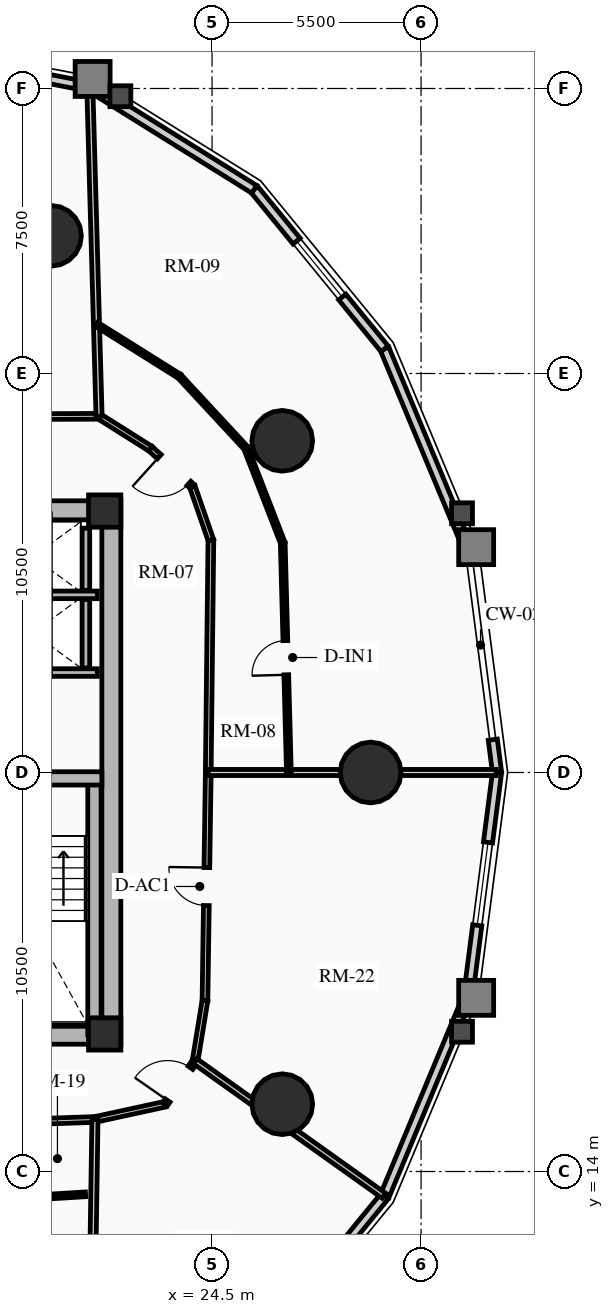
"""IFC4 building model, lengths in metres.
Left out: names, types, materials, properties, quantities, classifications, styles, units other than length and angle.
Written with IfcOpenShell. Run it as: python <this file> out.ifc"""

import sys

from ifc_helpers import new_model, si_unit, direction, frame, frame_2d, origin, origin_2d, place, context, subcontext, project, spatial, rectangle, circle, extrude, source, transform, mapped, element, fill, save


model = new_model("IFC4")
c1 = context("Model", 3, precision=1e-05, world=origin(), true_north=direction((0.0, 1.0)))
c2 = subcontext(c1, "Body", "Model", "MODEL_VIEW")
j1 = project(units=[si_unit("LENGTHUNIT", "METRE"), si_unit("PLANEANGLEUNIT", "RADIAN")], contexts=[c1])
p1 = place(None, origin())
s1 = spatial("IfcSite", under=j1, at=p1, CompositionType="ELEMENT")
p2 = place(p1, origin())
s2 = spatial("IfcBuilding", under=s1, at=p2, CompositionType="ELEMENT")
p3 = place(p2, frame((0.0, 0.0, 39.46)))
s3 = spatial("IfcBuildingStorey", under=s2, at=p3, CompositionType="ELEMENT", Elevation=39.46)
p4 = place(p3, frame((21.85, 17.35, 0.0), z_axis=(0.0, 0.0, 1.0), x_axis=(0.0, 1.0, 0.0)))
e1 = element("IfcWall", 1, at=p4, inside=s3, PredefinedType="SHEAR", context=c2, shape_type="SweptSolid", body=[
    extrude(rectangle(XDim=14.3, YDim=0.5, at=frame_2d((7.15, 0.0))), origin(), (0.0, 0.0, 1.0), 2.91),
])
p5 = place(p3, frame((11.15, 17.6, 0.0), z_axis=(0.0, 0.0, 1.0), x_axis=(1.0, 0.0, 0.0)))
e2 = element("IfcWall", 2, at=p5, inside=s3, PredefinedType="SHEAR", context=c2, shape_type="SweptSolid", body=[
    extrude(rectangle(XDim=10.7, YDim=0.5, at=frame_2d((5.35, 0.0))), origin(), (0.0, 0.0, 1.0), 2.91),
])
m1 = source(origin(), c2, "Body", "SweptSolid", [
    extrude(rectangle(XDim=1.5, YDim=2.02, at=frame_2d((0.75, 1.01))), frame((0.0, 0.26, 0.0), z_axis=(0.0, -1.0, 0.0), x_axis=(1.0, 0.0, 0.0)), (0.0, 0.0, 1.0), 0.52),
])
p6 = place(p5, frame((5.45, 0.0, 0.0)))
e3 = element("IfcOpeningElement", 3, at=p6, cuts=e2, PredefinedType="OPENING", context=c2, shape_type="MappedRepresentation", body=[
    mapped(m1, transform((0.0, 0.0, 0.0), x_axis=(1.0, 0.0, 0.0), y_axis=(0.0, 1.0, 0.0), z_axis=(0.0, 0.0, 1.0), scale=1.0)),
])
p7 = place(p3, frame((11.15, 31.4, 0.0), z_axis=(0.0, 0.0, 1.0), x_axis=(1.0, 0.0, 0.0)))
e4 = element("IfcWall", 4, at=p7, inside=s3, PredefinedType="SHEAR", context=c2, shape_type="SweptSolid", body=[
    extrude(rectangle(XDim=10.7, YDim=0.5, at=frame_2d((5.35, 0.0))), origin(), (0.0, 0.0, 1.0), 2.91),
])
p8 = place(p7, frame((4.6, 0.0, 0.0)))
e5 = element("IfcOpeningElement", 5, at=p8, cuts=e4, PredefinedType="OPENING", context=c2, shape_type="MappedRepresentation", body=[
    mapped(m1, transform((0.0, 0.0, 0.0), x_axis=(1.0, 0.0, 0.0), y_axis=(0.0, 1.0, 0.0), z_axis=(0.0, 0.0, 1.0), scale=1.0)),
])
p9 = place(p3, frame((21.405, 17.6, 0.0), z_axis=(0.0, 0.0, 1.0), x_axis=(0.0, 1.0, 0.0)))
e6 = element("IfcWall", 6, at=p9, inside=s3, PredefinedType="SHEAR", context=c2, shape_type="SweptSolid", body=[
    extrude(rectangle(XDim=6.745, YDim=0.35, at=frame_2d((3.373, 0.0))), origin(), (0.0, 0.0, 1.0), 2.91),
])
p10 = place(p3, frame((18.315, 24.345, 0.0), z_axis=(0.0, 0.0, 1.0), x_axis=(1.0, 0.0, 0.0)))
e7 = element("IfcWall", 7, at=p10, inside=s3, PredefinedType="SHEAR", context=c2, shape_type="SweptSolid", body=[
    extrude(rectangle(XDim=3.285, YDim=0.35, at=frame_2d((1.643, 0.0))), origin(), (0.0, 0.0, 1.0), 2.91),
])
for number, where, z_axis, x_axis in (
    (8, (21.675, 17.62, 0.0), (0.0, 0.0, 1.0), (1.0, 0.0, 0.0)),
    (9, (21.675, 31.38, 0.0), (0.0, 0.0, 1.0), (1.0, 0.0, 0.0)),
):
    element("IfcColumn", number, at=place(p3, frame(where, z_axis=z_axis, x_axis=x_axis)), inside=s3, PredefinedType="COLUMN", context=c2, shape_type="SweptSolid", body=[
        extrude(rectangle(XDim=0.85, YDim=0.85, at=origin_2d()), origin(), (0.0, 0.0, 1.0), 2.91),
    ])
for number, where, z_axis, x_axis in (
    (10, (28.672, 24.5, 0.0), (0.0, 0.0, 1.0), (1.0, 0.0, 0.0)),
    (11, (26.347, 33.229, 0.0), (0.0, 0.0, 1.0), (1.0, 0.0, 0.0)),
    (12, (20.261, 38.623, 0.0), (0.0, 0.0, 1.0), (1.0, 0.0, 0.0)),
    (13, (26.347, 15.771, 0.0), (0.0, 0.0, 1.0), (1.0, 0.0, 0.0)),
):
    element("IfcColumn", number, at=place(p3, frame(where, z_axis=z_axis, x_axis=x_axis)), inside=s3, PredefinedType="USERDEFINED", context=c2, shape_type="SweptSolid", body=[
        extrude(circle(Radius=0.8, at=origin_2d()), origin(), (0.0, 0.0, 1.0), 2.91),
    ])
p11 = place(p3, frame((31.887, 25.363, 0.0), z_axis=(0.0, 0.0, 1.0), x_axis=(0.128523364007, -0.991706481225, 0.0)))
e14 = element("IfcWall", 14, at=p11, inside=s3, PredefinedType="SOLIDWALL", context=c2, shape_type="SweptSolid", body=[
    extrude(rectangle(XDim=0.87, YDim=0.24, at=frame_2d((0.435, 0.0))), origin(), (0.0, 0.0, 1.0), 2.635),
])
p12 = place(p3, frame((29.039, 35.65, 0.0), z_axis=(0.0, 0.0, 1.0), x_axis=(0.38430970593, -0.923204229804, 0.0)))
e15 = element("IfcWall", 15, at=p12, inside=s3, PredefinedType="SOLIDWALL", context=c2, shape_type="SweptSolid", body=[
    extrude(rectangle(XDim=5.728, YDim=0.24, at=frame_2d((2.864, 0.0))), origin(), (0.0, 0.0, 1.0), 2.073),
])
p13 = place(p3, frame((25.61, 39.847, 0.0), z_axis=(0.0, 0.0, 1.0), x_axis=(0.632710215588, -0.774388651189, 0.0)))
e16 = element("IfcWall", 16, at=p13, inside=s3, PredefinedType="SOLIDWALL", context=c2, shape_type="SweptSolid", body=[
    extrude(rectangle(XDim=5.419, YDim=0.24, at=frame_2d((2.71, 0.0))), origin(), (0.0, 0.0, 1.0), 2.073),
])
m2 = source(origin(), c2, "Body", "SweptSolid", [
    extrude(rectangle(XDim=1.9, YDim=1.35, at=frame_2d((0.95, 0.675))), frame((0.0, 0.13, 0.0), z_axis=(0.0, -1.0, 0.0), x_axis=(1.0, 0.0, 0.0)), (0.0, 0.0, 1.0), 0.26),
])
p14 = place(p13, frame((1.76, 0.0, 0.65)))
e17 = element("IfcOpeningElement", 17, at=p14, cuts=e16, PredefinedType="OPENING", context=c2, shape_type="MappedRepresentation", body=[
    mapped(m2, transform((0.0, 0.0, 0.0), x_axis=(1.0, 0.0, 0.0), y_axis=(0.0, 1.0, 0.0), z_axis=(0.0, 0.0, 1.0), scale=1.0)),
])
p15 = place(p3, frame((21.29, 42.542, 0.0), z_axis=(0.0, 0.0, 1.0), x_axis=(0.848528534887, -0.529149624853, 0.0)))
e18 = element("IfcWall", 18, at=p15, inside=s3, PredefinedType="SOLIDWALL", context=c2, shape_type="SweptSolid", body=[
    extrude(rectangle(XDim=5.092, YDim=0.24, at=frame_2d((2.546, 0.0))), origin(), (0.0, 0.0, 1.0), 2.073),
])
p16 = place(p3, frame((16.5, 43.47, 0.0), z_axis=(0.0, 0.0, 1.0), x_axis=(0.981724094622, -0.190309752872, 0.0)))
e19 = element("IfcWall", 19, at=p16, inside=s3, PredefinedType="SOLIDWALL", context=c2, shape_type="SweptSolid", body=[
    extrude(rectangle(XDim=4.879, YDim=0.24, at=frame_2d((2.439, 0.0))), origin(), (0.0, 0.0, 1.0), 2.073),
])
m3 = source(origin(), c2, "Body", "SweptSolid", [
    extrude(rectangle(XDim=2.2, YDim=1.35, at=frame_2d((1.1, 0.675))), frame((0.0, 0.13, 0.0), z_axis=(0.0, -1.0, 0.0), x_axis=(1.0, 0.0, 0.0)), (0.0, 0.0, 1.0), 0.26),
])
p17 = place(p16, frame((1.339, 0.0, 0.65)))
e20 = element("IfcOpeningElement", 20, at=p17, cuts=e19, PredefinedType="OPENING", context=c2, shape_type="MappedRepresentation", body=[
    mapped(m3, transform((0.0, 0.0, 0.0), x_axis=(1.0, 0.0, 0.0), y_axis=(0.0, 1.0, 0.0), z_axis=(0.0, 0.0, 1.0), scale=1.0)),
])
p18 = place(p3, frame((29.039, 13.35, 0.0), z_axis=(0.0, 0.0, 1.0), x_axis=(-0.632710215588, -0.774388651189, 0.0)))
e21 = element("IfcWall", 21, at=p18, inside=s3, PredefinedType="SOLIDWALL", context=c2, shape_type="SweptSolid", body=[
    extrude(rectangle(XDim=5.419, YDim=0.24, at=frame_2d((2.71, 0.0))), origin(), (0.0, 0.0, 1.0), 2.073),
])
p19 = place(p18, frame((1.76, 0.0, 0.65)))
e22 = element("IfcOpeningElement", 22, at=p19, cuts=e21, PredefinedType="OPENING", context=c2, shape_type="MappedRepresentation", body=[
    mapped(m2, transform((0.0, 0.0, 0.0), x_axis=(1.0, 0.0, 0.0), y_axis=(0.0, 1.0, 0.0), z_axis=(0.0, 0.0, 1.0), scale=1.0)),
])
p20 = place(p3, frame((31.24, 18.638, 0.0), z_axis=(0.0, 0.0, 1.0), x_axis=(-0.38430970593, -0.923204229804, 0.0)))
e23 = element("IfcWall", 23, at=p20, inside=s3, PredefinedType="SOLIDWALL", context=c2, shape_type="SweptSolid", body=[
    extrude(rectangle(XDim=5.728, YDim=0.24, at=frame_2d((2.864, 0.0))), origin(), (0.0, 0.0, 1.0), 2.073),
])
p21 = place(p3, frame((31.999, 24.5, 0.0), z_axis=(0.0, 0.0, 1.0), x_axis=(-0.128329107357, -0.991731637191, 0.0)))
e24 = element("IfcWall", 24, at=p21, inside=s3, PredefinedType="SOLIDWALL", context=c2, shape_type="SweptSolid", body=[
    extrude(rectangle(XDim=5.911, YDim=0.24, at=frame_2d((2.956, 0.0))), origin(), (0.0, 0.0, 1.0), 2.073),
])
p22 = place(p21, frame((1.855, 0.0, 0.65)))
e25 = element("IfcOpeningElement", 25, at=p22, cuts=e24, PredefinedType="OPENING", context=c2, shape_type="MappedRepresentation", body=[
    mapped(m3, transform((0.0, 0.0, 0.0), x_axis=(1.0, 0.0, 0.0), y_axis=(0.0, 1.0, 0.0), z_axis=(0.0, 0.0, 1.0), scale=1.0)),
])
for number, where, z_axis, x_axis in (
    (26, (18.51, 27.13, 0.0), (0.0, 0.0, 1.0), (1.0, 0.0, 0.0)),
    (27, (18.51, 29.175, 0.0), (0.0, 0.0, 1.0), (1.0, 0.0, 0.0)),
):
    element("IfcWall", number, at=place(p3, frame(where, z_axis=z_axis, x_axis=x_axis)), inside=s3, PredefinedType="SHEAR", context=c2, shape_type="SweptSolid", body=[
        extrude(rectangle(XDim=2.97, YDim=0.2, at=frame_2d((1.485, 0.0))), origin(), (0.0, 0.0, 1.0), 2.91),
    ])
p23 = place(p3, frame((21.18, 27.25, 0.0), z_axis=(0.0, 0.0, 1.0), x_axis=(0.0, 1.0, 0.0)))
e28 = element("IfcWall", 28, at=p23, inside=s3, PredefinedType="SHEAR", context=c2, shape_type="SweptSolid", body=[
    extrude(rectangle(XDim=1.805, YDim=0.2, at=frame_2d((0.902, 0.0))), origin(), (0.0, 0.0, 1.0), 2.91),
])
p24 = place(p3, frame((21.18, 29.295, 0.0), z_axis=(0.0, 0.0, 1.0), x_axis=(0.0, 1.0, 0.0)))
e29 = element("IfcWall", 29, at=p24, inside=s3, PredefinedType="SHEAR", context=c2, shape_type="SweptSolid", body=[
    extrude(rectangle(XDim=1.635, YDim=0.2, at=frame_2d((0.817, 0.0))), origin(), (0.0, 0.0, 1.0), 2.91),
])
p25 = place(p3, frame((24.4, 24.5, 0.0), z_axis=(0.0, 0.0, 1.0), x_axis=(0.011299841544, 0.999936154752, 0.0)))
e30 = element("IfcWall", 30, at=p25, inside=s3, PredefinedType="PARTITIONING", context=c2, shape_type="SweptSolid", body=[
    extrude(rectangle(XDim=6.115, YDim=0.15, at=frame_2d((3.057, 0.0))), origin(), (0.0, 0.0, 1.0), 2.159),
])
p26 = place(p3, frame((24.469, 30.614, 0.0), z_axis=(0.0, 0.0, 1.0), x_axis=(-0.327228335485, 0.944945298129, 0.0)))
e31 = element("IfcWall", 31, at=p26, inside=s3, PredefinedType="PARTITIONING", context=c2, shape_type="SweptSolid", body=[
    extrude(rectangle(XDim=1.495, YDim=0.15, at=frame_2d((0.748, 0.0))), origin(), (0.0, 0.0, 1.0), 2.205),
])
p27 = place(p3, frame((23.98, 32.027, 0.0), z_axis=(0.0, 0.0, 1.0), x_axis=(-0.742353224332, 0.670008724065, 0.0)))
e32 = element("IfcWall", 32, at=p27, inside=s3, PredefinedType="PARTITIONING", context=c2, shape_type="SweptSolid", body=[
    extrude(rectangle(XDim=1.485, YDim=0.15, at=frame_2d((0.742, 0.0))), origin(), (0.0, 0.0, 1.0), 2.159),
])
m4 = source(origin(), c2, "Body", "SweptSolid", [
    extrude(rectangle(XDim=1.05, YDim=2.015, at=frame_2d((0.525, 1.007))), frame((0.0, 0.085, 0.0), z_axis=(0.0, -1.0, 0.0), x_axis=(1.0, 0.0, 0.0)), (0.0, 0.0, 1.0), 0.17),
])
p28 = place(p27, frame((0.12, 0.0, 0.0)))
e33 = element("IfcOpeningElement", 33, at=p28, cuts=e32, PredefinedType="OPENING", context=c2, shape_type="MappedRepresentation", body=[
    mapped(m4, transform((0.0, 0.0, 0.0), x_axis=(1.0, 0.0, 0.0), y_axis=(0.0, 1.0, 0.0), z_axis=(0.0, 0.0, 1.0), scale=1.0)),
])
p29 = place(p3, frame((22.877, 33.022, 0.0), z_axis=(0.0, 0.0, 1.0), x_axis=(-0.845895608855, 0.533348496689, 0.0)))
e34 = element("IfcWall", 34, at=p29, inside=s3, PredefinedType="PARTITIONING", context=c2, shape_type="SweptSolid", body=[
    extrude(rectangle(XDim=1.597, YDim=0.15, at=frame_2d((0.798, 0.0))), origin(), (0.0, 0.0, 1.0), 2.205),
])
p30 = place(p3, frame((21.527, 33.873, 0.0), z_axis=(0.0, 0.0, 1.0), x_axis=(-0.999991838845, -0.004040079574, 0.0)))
e35 = element("IfcWall", 35, at=p30, inside=s3, PredefinedType="PARTITIONING", context=c2, shape_type="SweptSolid", body=[
    extrude(rectangle(XDim=3.384, YDim=0.15, at=frame_2d((1.692, 0.0))), origin(), (0.0, 0.0, 1.0), 2.159),
])
p31 = place(p30, frame((1.56, 0.0, 0.0)))
e36 = element("IfcOpeningElement", 36, at=p31, cuts=e35, PredefinedType="OPENING", context=c2, shape_type="MappedRepresentation", body=[
    mapped(m4, transform((0.0, 0.0, 0.0), x_axis=(1.0, 0.0, 0.0), y_axis=(0.0, 1.0, 0.0), z_axis=(0.0, 0.0, 1.0), scale=1.0)),
])
p32 = place(p3, frame((14.781, 15.141, 0.0), z_axis=(0.0, 0.0, 1.0), x_axis=(0.999407918707, 0.034406569513, 0.0)))
e37 = element("IfcWall", 37, at=p32, inside=s3, PredefinedType="PARTITIONING", context=c2, shape_type="SweptSolid", body=[
    extrude(rectangle(XDim=6.642, YDim=0.15, at=frame_2d((3.321, 0.0))), origin(), (0.0, 0.0, 1.0), 2.159),
])
p33 = place(p3, frame((21.419, 15.369, 0.0), z_axis=(0.0, 0.0, 1.0), x_axis=(0.977192701953, 0.212354475464, 0.0)))
e38 = element("IfcWall", 38, at=p33, inside=s3, PredefinedType="PARTITIONING", context=c2, shape_type="SweptSolid", body=[
    extrude(rectangle(XDim=1.888, YDim=0.15, at=frame_2d((0.944, 0.0))), origin(), (0.0, 0.0, 1.0), 2.205),
])
p34 = place(p3, frame((23.263, 15.77, 0.0), z_axis=(0.0, 0.0, 1.0), x_axis=(0.570743456919, 0.821128434768, 0.0)))
e39 = element("IfcWall", 39, at=p34, inside=s3, PredefinedType="PARTITIONING", context=c2, shape_type="SweptSolid", body=[
    extrude(rectangle(XDim=1.382, YDim=0.15, at=frame_2d((0.691, 0.0))), origin(), (0.0, 0.0, 1.0), 2.159),
])
p35 = place(p34, frame((0.12, 0.0, 0.0)))
e40 = element("IfcOpeningElement", 40, at=p35, cuts=e39, PredefinedType="OPENING", context=c2, shape_type="MappedRepresentation", body=[
    mapped(m4, transform((0.0, 0.0, 0.0), x_axis=(1.0, 0.0, 0.0), y_axis=(0.0, 1.0, 0.0), z_axis=(0.0, 0.0, 1.0), scale=1.0)),
])
p36 = place(p3, frame((24.052, 16.905, 0.0), z_axis=(0.0, 0.0, 1.0), x_axis=(0.162091534225, 0.986775726562, 0.0)))
e41 = element("IfcWall", 41, at=p36, inside=s3, PredefinedType="PARTITIONING", context=c2, shape_type="SweptSolid", body=[
    extrude(rectangle(XDim=1.613, YDim=0.15, at=frame_2d((0.807, 0.0))), origin(), (0.0, 0.0, 1.0), 2.205),
])
p37 = place(p3, frame((24.313, 18.496, 0.0), z_axis=(0.0, 0.0, 1.0), x_axis=(0.014394019188, 0.999896400739, 0.0)))
e42 = element("IfcWall", 42, at=p37, inside=s3, PredefinedType="PARTITIONING", context=c2, shape_type="SweptSolid", body=[
    extrude(rectangle(XDim=6.004, YDim=0.15, at=frame_2d((3.002, 0.0))), origin(), (0.0, 0.0, 1.0), 2.635),
])
m5 = source(origin(), c2, "Body", "SweptSolid", [
    extrude(rectangle(XDim=1.0, YDim=2.015, at=frame_2d((0.5, 1.007))), frame((0.0, 0.085, 0.0), z_axis=(0.0, -1.0, 0.0), x_axis=(1.0, 0.0, 0.0)), (0.0, 0.0, 1.0), 0.17),
])
p38 = place(p37, frame((2.502, 0.0, 0.0)))
e43 = element("IfcOpeningElement", 43, at=p38, cuts=e42, PredefinedType="OPENING", context=c2, shape_type="MappedRepresentation", body=[
    mapped(m5, transform((0.0, 0.0, 0.0), x_axis=(1.0, 0.0, 0.0), y_axis=(0.0, 1.0, 0.0), z_axis=(0.0, 0.0, 1.0), scale=1.0)),
])
p39 = place(p3, frame((24.4, 24.5, 0.0), z_axis=(0.0, 0.0, 1.0), x_axis=(1.0, 0.0, 0.0)))
e44 = element("IfcWall", 44, at=p39, inside=s3, PredefinedType="PARTITIONING", context=c2, shape_type="SweptSolid", body=[
    extrude(rectangle(XDim=7.579, YDim=0.16, at=frame_2d((3.79, 0.0))), origin(), (0.0, 0.0, 1.0), 2.073),
])
p40 = place(p3, frame((21.527, 33.873, 0.0), z_axis=(0.0, 0.0, 1.0), x_axis=(-0.028159433134, 0.999603444535, 0.0)))
e45 = element("IfcWall", 45, at=p40, inside=s3, PredefinedType="PARTITIONING", context=c2, shape_type="SweptSolid", body=[
    extrude(rectangle(XDim=8.653, YDim=0.16, at=frame_2d((4.326, 0.0))), origin(), (0.0, 0.0, 1.0), 2.073),
])
p41 = place(p3, frame((21.419, 15.369, 0.0), z_axis=(0.0, 0.0, 1.0), x_axis=(-0.015237110632, -0.999883908491, 0.0)))
e46 = element("IfcWall", 46, at=p41, inside=s3, PredefinedType="PARTITIONING", context=c2, shape_type="SweptSolid", body=[
    extrude(rectangle(XDim=8.893, YDim=0.16, at=frame_2d((4.446, 0.0))), origin(), (0.0, 0.0, 1.0), 2.073),
])
p42 = place(p3, frame((24.052, 16.905, 0.0), z_axis=(0.0, 0.0, 1.0), x_axis=(0.814316784985, -0.580420686822, 0.0)))
e47 = element("IfcWall", 47, at=p42, inside=s3, PredefinedType="PARTITIONING", context=c2, shape_type="SweptSolid", body=[
    extrude(rectangle(XDim=6.104, YDim=0.16, at=frame_2d((3.052, 0.0))), origin(), (0.0, 0.0, 1.0), 2.073),
])
p43 = place(p3, frame((26.522, 24.5, 0.0), z_axis=(0.0, 0.0, 1.0), x_axis=(-0.026902612335, 0.999638059224, 0.0)))
e48 = element("IfcWall", 48, at=p43, inside=s3, PredefinedType="PARTITIONING", context=c2, shape_type="SweptSolid", body=[
    extrude(rectangle(XDim=6.044, YDim=0.125, at=frame_2d((3.022, 0.0))), origin(), (0.0, 0.0, 1.0), 2.159),
])
m6 = source(origin(), c2, "Body", "SweptSolid", [
    extrude(rectangle(XDim=0.9, YDim=2.005, at=frame_2d((0.45, 1.002))), frame((0.0, 0.073, 0.0), z_axis=(0.0, -1.0, 0.0), x_axis=(1.0, 0.0, 0.0)), (0.0, 0.0, 1.0), 0.145),
])
p44 = place(p43, frame((2.572, 0.0, 0.0)))
e49 = element("IfcOpeningElement", 49, at=p44, cuts=e48, PredefinedType="OPENING", context=c2, shape_type="MappedRepresentation", body=[
    mapped(m6, transform((0.0, 0.0, 0.0), x_axis=(1.0, 0.0, 0.0), y_axis=(0.0, 1.0, 0.0), z_axis=(0.0, 0.0, 1.0), scale=1.0)),
])
p45 = place(p3, frame((26.36, 30.542, 0.0), z_axis=(0.0, 0.0, 1.0), x_axis=(-0.361464762384, 0.932385770781, 0.0)))
e50 = element("IfcWall", 50, at=p45, inside=s3, PredefinedType="PARTITIONING", context=c2, shape_type="SweptSolid", body=[
    extrude(rectangle(XDim=2.677, YDim=0.125, at=frame_2d((1.339, 0.0))), origin(), (0.0, 0.0, 1.0), 2.159),
])
p46 = place(p3, frame((25.392, 33.038, 0.0), z_axis=(0.0, 0.0, 1.0), x_axis=(-0.67989141147, 0.733312804068, 0.0)))
e51 = element("IfcWall", 51, at=p46, inside=s3, PredefinedType="PARTITIONING", context=c2, shape_type="SweptSolid", body=[
    extrude(rectangle(XDim=2.578, YDim=0.125, at=frame_2d((1.289, 0.0))), origin(), (0.0, 0.0, 1.0), 2.635),
])
p47 = place(p3, frame((23.639, 34.928, 0.0), z_axis=(0.0, 0.0, 1.0), x_axis=(-0.847294097071, 0.531124009125, 0.0)))
e52 = element("IfcWall", 52, at=p47, inside=s3, PredefinedType="PARTITIONING", context=c2, shape_type="SweptSolid", body=[
    extrude(rectangle(XDim=2.574, YDim=0.125, at=frame_2d((1.287, 0.0))), origin(), (0.0, 0.0, 1.0), 2.205),
])
p48 = place(p3, frame((18.181, 13.216, 0.0), z_axis=(0.0, 0.0, 1.0), x_axis=(0.998120468621, 0.061282380177, 0.0)))
e53 = element("IfcWall", 53, at=p48, inside=s3, PredefinedType="PARTITIONING", context=c2, shape_type="SweptSolid", body=[
    extrude(rectangle(XDim=2.996, YDim=0.125, at=frame_2d((1.498, 0.0))), origin(), (0.0, 0.0, 1.0), 2.159),
])
p49 = place(p48, frame((0.12, 0.0, 0.0)))
e54 = element("IfcOpeningElement", 54, at=p49, cuts=e53, PredefinedType="OPENING", context=c2, shape_type="MappedRepresentation", body=[
    mapped(m6, transform((0.0, 0.0, 0.0), x_axis=(1.0, 0.0, 0.0), y_axis=(0.0, 1.0, 0.0), z_axis=(0.0, 0.0, 1.0), scale=1.0)),
])
m7 = source(origin(), c2, "Body", "SweptSolid", [
    extrude(rectangle(XDim=1.9, YDim=1.35, at=frame_2d((0.95, 0.675))), frame((0.0, 0.03, 0.0), z_axis=(0.0, -1.0, 0.0), x_axis=(1.0, 0.0, 0.0)), (0.0, 0.0, 1.0), 0.06),
])
p50 = place(p14, origin())
e55 = element("IfcWindow", 55, at=p50, inside=s3, PartitioningType="DOUBLE_PANEL_VERTICAL", PredefinedType="WINDOW", context=c2, shape_type="MappedRepresentation", body=[
    mapped(m7, transform((0.0, 0.0, 0.0), x_axis=(1.0, 0.0, 0.0), y_axis=(0.0, 1.0, 0.0), z_axis=(0.0, 0.0, 1.0), scale=1.0)),
])
fill(e17, e55)
m8 = source(origin(), c2, "Body", "SweptSolid", [
    extrude(rectangle(XDim=2.2, YDim=1.35, at=frame_2d((1.1, 0.675))), frame((0.0, 0.03, 0.0), z_axis=(0.0, -1.0, 0.0), x_axis=(1.0, 0.0, 0.0)), (0.0, 0.0, 1.0), 0.06),
])
p51 = place(p22, origin())
e56 = element("IfcWindow", 56, at=p51, inside=s3, PartitioningType="DOUBLE_PANEL_VERTICAL", PredefinedType="WINDOW", context=c2, shape_type="MappedRepresentation", body=[
    mapped(m8, transform((0.0, 0.0, 0.0), x_axis=(1.0, 0.0, 0.0), y_axis=(0.0, 1.0, 0.0), z_axis=(0.0, 0.0, 1.0), scale=1.0)),
])
fill(e25, e56)
m9 = source(origin(), c2, "Body", "SweptSolid", [
    extrude(rectangle(XDim=1.05, YDim=2.015, at=frame_2d((0.525, 1.007))), frame((0.0, 0.025, 0.0), z_axis=(0.0, -1.0, 0.0), x_axis=(1.0, 0.0, 0.0)), (0.0, 0.0, 1.0), 0.05),
])
p52 = place(p28, origin())
e57 = element("IfcDoor", 57, at=p52, inside=s3, OperationType="SINGLE_SWING_RIGHT", PredefinedType="DOOR", context=c2, shape_type="MappedRepresentation", body=[
    mapped(m9, transform((0.0, 0.0, 0.0), x_axis=(1.0, 0.0, 0.0), y_axis=(0.0, 1.0, 0.0), z_axis=(0.0, 0.0, 1.0), scale=1.0)),
])
fill(e33, e57)
m10 = source(origin(), c2, "Body", "SweptSolid", [
    extrude(rectangle(XDim=0.9, YDim=2.005, at=frame_2d((0.45, 1.002))), frame((0.0, 0.025, 0.0), z_axis=(0.0, -1.0, 0.0), x_axis=(1.0, 0.0, 0.0)), (0.0, 0.0, 1.0), 0.05),
])
p53 = place(p44, origin())
e58 = element("IfcDoor", 58, at=p53, inside=s3, OperationType="SINGLE_SWING_LEFT", PredefinedType="DOOR", context=c2, shape_type="MappedRepresentation", body=[
    mapped(m10, transform((0.0, 0.0, 0.0), x_axis=(1.0, 0.0, 0.0), y_axis=(0.0, 1.0, 0.0), z_axis=(0.0, 0.0, 1.0), scale=1.0)),
])
fill(e49, e58)
p54 = place(p35, origin())
e59 = element("IfcDoor", 59, at=p54, inside=s3, OperationType="SINGLE_SWING_LEFT", PredefinedType="DOOR", context=c2, shape_type="MappedRepresentation", body=[
    mapped(m9, transform((0.0, 0.0, 0.0), x_axis=(1.0, 0.0, 0.0), y_axis=(0.0, 1.0, 0.0), z_axis=(0.0, 0.0, 1.0), scale=1.0)),
])
fill(e40, e59)
m11 = source(origin(), c2, "Body", "SweptSolid", [
    extrude(rectangle(XDim=1.0, YDim=2.015, at=frame_2d((0.5, 1.007))), frame((0.0, 0.025, 0.0), z_axis=(0.0, -1.0, 0.0), x_axis=(1.0, 0.0, 0.0)), (0.0, 0.0, 1.0), 0.05),
])
p55 = place(p38, origin())
e60 = element("IfcDoor", 60, at=p55, inside=s3, OperationType="SINGLE_SWING_RIGHT", PredefinedType="DOOR", context=c2, shape_type="MappedRepresentation", body=[
    mapped(m11, transform((0.0, 0.0, 0.0), x_axis=(1.0, 0.0, 0.0), y_axis=(0.0, 1.0, 0.0), z_axis=(0.0, 0.0, 1.0), scale=1.0)),
])
fill(e43, e60)
save(model, sys.argv[1])
